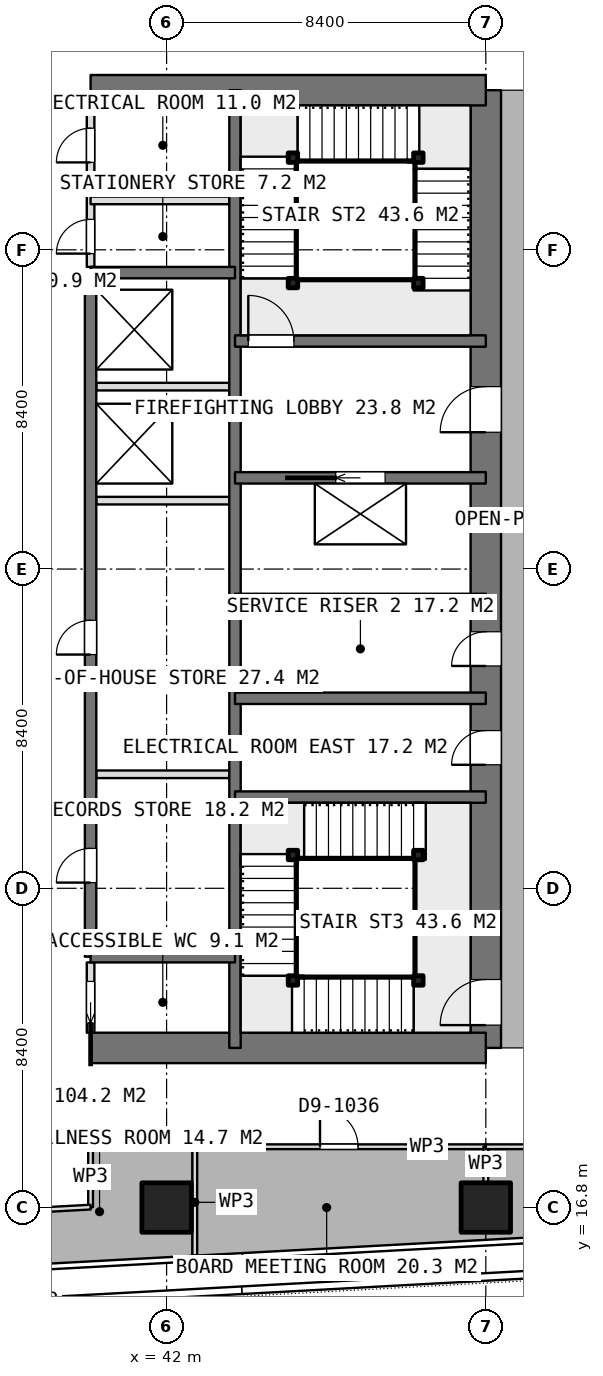
"""IFC4 building model, lengths in metres.
Left out: names, types, materials, properties, quantities, classifications, styles, units other than length and angle.
Written with IfcOpenShell. Run it as: python <this file> out.ifc"""

import sys

from ifc_helpers import new_model, si_unit, direction, frame, frame_2d, origin, origin_2d, place, context, subcontext, project, spatial, rectangle, extrude, element, fill, save


model = new_model("IFC4")
c1 = context("Model", 3, precision=1e-05, world=origin(), true_north=direction((0.0, 1.0)))
c2 = subcontext(c1, "Body", "Model", "MODEL_VIEW")
j1 = project(units=[si_unit("LENGTHUNIT", "METRE"), si_unit("PLANEANGLEUNIT", "RADIAN")], contexts=[c1])
p1 = place(None, origin())
s1 = spatial("IfcSite", under=j1, at=p1, CompositionType="ELEMENT")
p2 = place(p1, origin())
s2 = spatial("IfcBuilding", under=s1, at=p2, CompositionType="ELEMENT")
p3 = place(p2, frame((0.0, 0.0, 280.1)))
s3 = spatial("IfcBuildingStorey", under=s2, at=p3, CompositionType="ELEMENT", Elevation=280.1)
for number, where, z_axis, x_axis in (
    (1, (40.0, 21.0, 0.0), (0.0, 0.0, 1.0), (1.0, 0.0, 0.0)),
    (2, (40.0, 46.2, 0.0), (0.0, 0.0, 1.0), (1.0, 0.0, 0.0)),
):
    element("IfcWall", number, at=place(p3, frame(where, z_axis=z_axis, x_axis=x_axis)), inside=s3, PredefinedType="SHEAR", context=c2, shape_type="SweptSolid", body=[
        extrude(rectangle(XDim=10.4, YDim=0.8, at=frame_2d((5.2, 0.0))), origin(), (0.0, 0.0, 1.0), 3.75),
    ])
p4 = place(p3, frame((50.4, 21.0, 0.0), z_axis=(0.0, 0.0, 1.0), x_axis=(0.0, 1.0, 0.0)))
e3 = element("IfcWall", 3, at=p4, inside=s3, PredefinedType="SHEAR", context=c2, shape_type="SweptSolid", body=[
    extrude(rectangle(XDim=25.2, YDim=0.8, at=frame_2d((12.6, 0.0))), origin(), (0.0, 0.0, 1.0), 3.75),
])
p5 = place(p4, frame((16.2, 0.0, 0.0)))
e4 = element("IfcOpeningElement", 4, at=p5, cuts=e3, PredefinedType="OPENING", context=c2, shape_type="SweptSolid", body=[
    extrude(rectangle(XDim=1.2, YDim=2.1, at=frame_2d((0.6, 1.05))), frame((0.0, 0.41, 0.0), z_axis=(0.0, -1.0, 0.0), x_axis=(1.0, 0.0, 0.0)), (0.0, 0.0, 1.0), 0.82),
])
p6 = place(p4, frame((10.05, 0.0, 0.0)))
e5 = element("IfcOpeningElement", 5, at=p6, cuts=e3, PredefinedType="OPENING", context=c2, shape_type="SweptSolid", body=[
    extrude(rectangle(XDim=0.9, YDim=2.1, at=frame_2d((0.45, 1.05))), frame((0.0, 0.41, 0.0), z_axis=(0.0, -1.0, 0.0), x_axis=(1.0, 0.0, 0.0)), (0.0, 0.0, 1.0), 0.82),
])
p7 = place(p4, frame((7.45, 0.0, 0.0)))
e6 = element("IfcOpeningElement", 6, at=p7, cuts=e3, PredefinedType="OPENING", context=c2, shape_type="SweptSolid", body=[
    extrude(rectangle(XDim=0.9, YDim=2.1, at=frame_2d((0.45, 1.05))), frame((0.0, 0.41, 0.0), z_axis=(0.0, -1.0, 0.0), x_axis=(1.0, 0.0, 0.0)), (0.0, 0.0, 1.0), 0.82),
])
p8 = place(p4, frame((0.6, 0.0, 0.0)))
e7 = element("IfcOpeningElement", 7, at=p8, cuts=e3, PredefinedType="OPENING", context=c2, shape_type="SweptSolid", body=[
    extrude(rectangle(XDim=1.2, YDim=2.1, at=frame_2d((0.6, 1.05))), frame((0.0, 0.41, 0.0), z_axis=(0.0, -1.0, 0.0), x_axis=(1.0, 0.0, 0.0)), (0.0, 0.0, 1.0), 0.82),
])
p9 = place(p3, frame((43.8, 21.0, 0.0), z_axis=(0.0, 0.0, 1.0), x_axis=(0.0, 1.0, 0.0)))
e8 = element("IfcWall", 8, at=p9, inside=s3, PredefinedType="SHEAR", context=c2, shape_type="SweptSolid", body=[
    extrude(rectangle(XDim=25.2, YDim=0.3, at=frame_2d((12.6, 0.0))), origin(), (0.0, 0.0, 1.0), 3.75),
])
p10 = place(p3, frame((40.0, 23.4, 0.0), z_axis=(0.0, 0.0, 1.0), x_axis=(0.0, 1.0, 0.0)))
e9 = element("IfcWall", 9, at=p10, inside=s3, PredefinedType="SHEAR", context=c2, shape_type="SweptSolid", body=[
    extrude(rectangle(XDim=18.0, YDim=0.3, at=frame_2d((9.0, 0.0))), origin(), (0.0, 0.0, 1.0), 3.75),
])
p11 = place(p10, frame((1.95, 0.0, 0.0)))
e10 = element("IfcOpeningElement", 10, at=p11, cuts=e9, PredefinedType="OPENING", context=c2, shape_type="SweptSolid", body=[
    extrude(rectangle(XDim=0.9, YDim=2.1, at=frame_2d((0.45, 1.05))), frame((0.0, 0.16, 0.0), z_axis=(0.0, -1.0, 0.0), x_axis=(1.0, 0.0, 0.0)), (0.0, 0.0, 1.0), 0.32),
])
p12 = place(p10, frame((7.95, 0.0, 0.0)))
e11 = element("IfcOpeningElement", 11, at=p12, cuts=e9, PredefinedType="OPENING", context=c2, shape_type="SweptSolid", body=[
    extrude(rectangle(XDim=0.9, YDim=2.1, at=frame_2d((0.45, 1.05))), frame((0.0, 0.16, 0.0), z_axis=(0.0, -1.0, 0.0), x_axis=(1.0, 0.0, 0.0)), (0.0, 0.0, 1.0), 0.32),
])
for number, where, z_axis, x_axis in (
    (12, (40.0, 23.4, 0.0), (0.0, 0.0, 1.0), (1.0, 0.0, 0.0)),
    (13, (40.0, 41.4, 0.0), (0.0, 0.0, 1.0), (1.0, 0.0, 0.0)),
):
    element("IfcWall", number, at=place(p3, frame(where, z_axis=z_axis, x_axis=x_axis)), inside=s3, PredefinedType="SHEAR", context=c2, shape_type="SweptSolid", body=[
        extrude(rectangle(XDim=3.8, YDim=0.3, at=frame_2d((1.9, 0.0))), origin(), (0.0, 0.0, 1.0), 3.75),
    ])
for number, where, z_axis, x_axis in (
    (14, (43.8, 27.6, 0.0), (0.0, 0.0, 1.0), (1.0, 0.0, 0.0)),
    (15, (43.8, 30.2, 0.0), (0.0, 0.0, 1.0), (1.0, 0.0, 0.0)),
    (16, (43.8, 32.8, 0.0), (0.0, 0.0, 1.0), (1.0, 0.0, 0.0)),
):
    element("IfcWall", number, at=place(p3, frame(where, z_axis=z_axis, x_axis=x_axis)), inside=s3, PredefinedType="SHEAR", context=c2, shape_type="SweptSolid", body=[
        extrude(rectangle(XDim=6.6, YDim=0.3, at=frame_2d((3.3, 0.0))), origin(), (0.0, 0.0, 1.0), 3.75),
    ])
p13 = place(p3, frame((43.8, 36.0, 0.0), z_axis=(0.0, 0.0, 1.0), x_axis=(1.0, 0.0, 0.0)))
e17 = element("IfcWall", 17, at=p13, inside=s3, PredefinedType="SHEAR", context=c2, shape_type="SweptSolid", body=[
    extrude(rectangle(XDim=6.6, YDim=0.3, at=frame_2d((3.3, 0.0))), origin(), (0.0, 0.0, 1.0), 3.75),
])
p14 = place(p13, frame((2.65, 0.0, 0.0)))
e18 = element("IfcOpeningElement", 18, at=p14, cuts=e17, PredefinedType="OPENING", context=c2, shape_type="SweptSolid", body=[
    extrude(rectangle(XDim=1.3, YDim=2.1, at=frame_2d((0.65, 1.05))), frame((0.0, 0.16, 0.0), z_axis=(0.0, -1.0, 0.0), x_axis=(1.0, 0.0, 0.0)), (0.0, 0.0, 1.0), 0.32),
])
p15 = place(p3, frame((43.8, 39.6, 0.0), z_axis=(0.0, 0.0, 1.0), x_axis=(1.0, 0.0, 0.0)))
e19 = element("IfcWall", 19, at=p15, inside=s3, PredefinedType="SHEAR", context=c2, shape_type="SweptSolid", body=[
    extrude(rectangle(XDim=6.6, YDim=0.3, at=frame_2d((3.3, 0.0))), origin(), (0.0, 0.0, 1.0), 3.75),
])
p16 = place(p15, frame((0.35, 0.0, 0.0)))
e20 = element("IfcOpeningElement", 20, at=p16, cuts=e19, PredefinedType="OPENING", context=c2, shape_type="SweptSolid", body=[
    extrude(rectangle(XDim=1.2, YDim=2.1, at=frame_2d((0.6, 1.05))), frame((0.0, 0.16, 0.0), z_axis=(0.0, -1.0, 0.0), x_axis=(1.0, 0.0, 0.0)), (0.0, 0.0, 1.0), 0.32),
])
for number, where, z_axis, x_axis in (
    (21, (42.0, 16.8, 0.0), (0.0, 0.0, 1.0), (1.0, 0.0, 0.0)),
    (22, (50.4, 16.8, 0.0), (0.0, 0.0, 1.0), (1.0, 0.0, 0.0)),
):
    element("IfcColumn", number, at=place(p3, frame(where, z_axis=z_axis, x_axis=x_axis)), inside=s3, PredefinedType="COLUMN", context=c2, shape_type="SweptSolid", body=[
        extrude(rectangle(XDim=1.3, YDim=1.3, at=origin_2d()), origin(), (0.0, 0.0, 1.0), 3.75),
    ])
for number, where, z_axis, x_axis in (
    (23, (40.15, 35.4, 0.0), (0.0, 0.0, 1.0), (1.0, 0.0, 0.0)),
    (24, (40.15, 38.4, 0.0), (0.0, 0.0, 1.0), (1.0, 0.0, 0.0)),
):
    element("IfcWall", number, at=place(p3, frame(where, z_axis=z_axis, x_axis=x_axis)), inside=s3, PredefinedType="PARTITIONING", context=c2, shape_type="SweptSolid", body=[
        extrude(rectangle(XDim=3.5, YDim=0.2, at=frame_2d((1.75, 0.0))), origin(), (0.0, 0.0, 1.0), 3.5),
    ])
p17 = place(p3, frame((40.0, 21.4, 0.0), z_axis=(0.0, 0.0, 1.0), x_axis=(0.0, 1.0, 0.0)))
e25 = element("IfcWall", 25, at=p17, inside=s3, PredefinedType="PARTITIONING", context=c2, shape_type="SweptSolid", body=[
    extrude(rectangle(XDim=1.85, YDim=0.2, at=frame_2d((0.925, 0.0))), origin(), (0.0, 0.0, 1.0), 3.5),
])
p18 = place(p17, frame((0.25, 0.0, 0.0)))
e26 = element("IfcOpeningElement", 26, at=p18, cuts=e25, PredefinedType="OPENING", context=c2, shape_type="SweptSolid", body=[
    extrude(rectangle(XDim=1.1, YDim=2.1, at=frame_2d((0.55, 1.05))), frame((0.0, 0.11, 0.0), z_axis=(0.0, -1.0, 0.0), x_axis=(1.0, 0.0, 0.0)), (0.0, 0.0, 1.0), 0.22),
])
p19 = place(p3, frame((40.0, 41.55, 0.0), z_axis=(0.0, 0.0, 1.0), x_axis=(0.0, 1.0, 0.0)))
e27 = element("IfcWall", 27, at=p19, inside=s3, PredefinedType="PARTITIONING", context=c2, shape_type="SweptSolid", body=[
    extrude(rectangle(XDim=4.25, YDim=0.2, at=frame_2d((2.125, 0.0))), origin(), (0.0, 0.0, 1.0), 3.5),
])
p20 = place(p19, frame((2.75, 0.0, 0.0)))
e28 = element("IfcOpeningElement", 28, at=p20, cuts=e27, PredefinedType="OPENING", context=c2, shape_type="SweptSolid", body=[
    extrude(rectangle(XDim=0.9, YDim=2.1, at=frame_2d((0.45, 1.05))), frame((0.0, 0.11, 0.0), z_axis=(0.0, -1.0, 0.0), x_axis=(1.0, 0.0, 0.0)), (0.0, 0.0, 1.0), 0.22),
])
p21 = place(p19, frame((0.35, 0.0, 0.0)))
e29 = element("IfcOpeningElement", 29, at=p21, cuts=e27, PredefinedType="OPENING", context=c2, shape_type="SweptSolid", body=[
    extrude(rectangle(XDim=0.9, YDim=2.1, at=frame_2d((0.45, 1.05))), frame((0.0, 0.11, 0.0), z_axis=(0.0, -1.0, 0.0), x_axis=(1.0, 0.0, 0.0)), (0.0, 0.0, 1.0), 0.22),
])
p22 = place(p3, frame((40.15, 28.2, 0.0), z_axis=(0.0, 0.0, 1.0), x_axis=(1.0, 0.0, 0.0)))
e30 = element("IfcWall", 30, at=p22, inside=s3, PredefinedType="PARTITIONING", context=c2, shape_type="SweptSolid", body=[
    extrude(rectangle(XDim=3.5, YDim=0.2, at=frame_2d((1.75, 0.0))), origin(), (0.0, 0.0, 1.0), 3.5),
])
p23 = place(p3, frame((40.0, 43.3, 0.0), z_axis=(0.0, 0.0, 1.0), x_axis=(1.0, 0.0, 0.0)))
e31 = element("IfcWall", 31, at=p23, inside=s3, PredefinedType="PARTITIONING", context=c2, shape_type="SweptSolid", body=[
    extrude(rectangle(XDim=3.65, YDim=0.2, at=frame_2d((1.825, 0.0))), origin(), (0.0, 0.0, 1.0), 3.5),
])
p24 = place(p3, frame((40.0, 16.811, 0.0), z_axis=(0.0, 0.0, 1.0), x_axis=(0.0, 1.0, 0.0)))
e32 = element("IfcWall", 32, at=p24, inside=s3, PredefinedType="PARTITIONING", context=c2, shape_type="SweptSolid", body=[
    extrude(rectangle(XDim=1.589, YDim=0.125, at=frame_2d((0.794, 0.0))), origin(), (0.0, 0.0, 1.0), 3.5),
])
p25 = place(p3, frame((40.0, 18.4, 0.0), z_axis=(0.0, 0.0, 1.0), x_axis=(1.0, 0.0, 0.0)))
e33 = element("IfcWall", 33, at=p25, inside=s3, PredefinedType="PARTITIONING", context=c2, shape_type="SweptSolid", body=[
    extrude(rectangle(XDim=2.673, YDim=0.125, at=frame_2d((1.336, 0.0))), origin(), (0.0, 0.0, 1.0), 3.5),
])
p26 = place(p3, frame((42.742, 18.337, 0.0), z_axis=(0.0, 0.0, 1.0), x_axis=(0.0, -1.0, 0.0)))
e34 = element("IfcWall", 34, at=p26, inside=s3, PredefinedType="PARTITIONING", context=c2, shape_type="SweptSolid", body=[
    extrude(rectangle(XDim=2.799, YDim=0.125, at=frame_2d((1.399, 0.0))), origin(), (0.0, 0.0, 1.0), 3.5),
])
p27 = place(p3, frame((35.599, 16.571, 0.0), z_axis=(0.0, 0.0, 1.0), x_axis=(0.998516419886, 0.054451439074, 0.0)))
e35 = element("IfcWall", 35, at=p27, inside=s3, PredefinedType="PARTITIONING", context=c2, shape_type="SweptSolid", body=[
    extrude(rectangle(XDim=4.407, YDim=0.125, at=frame_2d((2.204, 0.0))), origin(), (0.0, 0.0, 1.0), 3.5),
])
p28 = place(p27, frame((1.704, 0.0, 0.0)))
e36 = element("IfcOpeningElement", 36, at=p28, cuts=e35, PredefinedType="OPENING", context=c2, shape_type="SweptSolid", body=[
    extrude(rectangle(XDim=1.0, YDim=2.1, at=frame_2d((0.5, 1.05))), frame((0.0, 0.073, 0.0), z_axis=(0.0, -1.0, 0.0), x_axis=(1.0, 0.0, 0.0)), (0.0, 0.0, 1.0), 0.145),
])
p29 = place(p3, frame((42.674, 18.4, 0.0), z_axis=(0.0, 0.0, 1.0), x_axis=(1.0, 0.0, 0.0)))
e37 = element("IfcWall", 37, at=p29, inside=s3, PredefinedType="PARTITIONING", context=c2, shape_type="SweptSolid", body=[
    extrude(rectangle(XDim=7.726, YDim=0.125, at=frame_2d((3.863, 0.0))), origin(), (0.0, 0.0, 1.0), 3.5),
])
p30 = place(p29, frame((3.363, 0.0, 0.0)))
e38 = element("IfcOpeningElement", 38, at=p30, cuts=e37, PredefinedType="OPENING", context=c2, shape_type="SweptSolid", body=[
    extrude(rectangle(XDim=1.0, YDim=2.1, at=frame_2d((0.5, 1.05))), frame((0.0, 0.073, 0.0), z_axis=(0.0, -1.0, 0.0), x_axis=(1.0, 0.0, 0.0)), (0.0, 0.0, 1.0), 0.145),
])
p31 = place(p3, frame((50.4, 18.4, 0.0), z_axis=(0.0, 0.0, 1.0), x_axis=(0.0, -1.0, 0.0)))
e39 = element("IfcWall", 39, at=p31, inside=s3, PredefinedType="PARTITIONING", context=c2, shape_type="SweptSolid", body=[
    extrude(rectangle(XDim=0.93, YDim=0.125, at=frame_2d((0.465, 0.0))), origin(), (0.0, 0.0, 1.0), 3.5),
])
p32 = place(p3, frame((50.401, 18.4, 0.0), z_axis=(0.0, 0.0, 1.0), x_axis=(1.0, 0.0, 0.0)))
e40 = element("IfcWall", 40, at=p32, inside=s3, PredefinedType="PARTITIONING", context=c2, shape_type="SweptSolid", body=[
    extrude(rectangle(XDim=5.999, YDim=0.125, at=frame_2d((3.0, 0.0))), origin(), (0.0, 0.0, 1.0), 3.5),
])
p33 = place(p32, frame((2.499, 0.0, 0.0)))
e41 = element("IfcOpeningElement", 41, at=p33, cuts=e40, PredefinedType="OPENING", context=c2, shape_type="SweptSolid", body=[
    extrude(rectangle(XDim=1.0, YDim=2.1, at=frame_2d((0.5, 1.05))), frame((0.0, 0.073, 0.0), z_axis=(0.0, -1.0, 0.0), x_axis=(1.0, 0.0, 0.0)), (0.0, 0.0, 1.0), 0.145),
])
for number, where, z_axis, x_axis in (
    (42, (45.325, 41.125, 0.0), (0.0, 0.0, 1.0), (1.0, 0.0, 0.0)),
    (43, (45.325, 44.425, 0.0), (0.0, 0.0, 1.0), (1.0, 0.0, 0.0)),
    (44, (48.625, 44.425, 0.0), (0.0, 0.0, 1.0), (1.0, 0.0, 0.0)),
    (45, (48.625, 41.125, 0.0), (0.0, 0.0, 1.0), (1.0, 0.0, 0.0)),
    (46, (48.625, 22.775, 0.0), (0.0, 0.0, 1.0), (1.0, 0.0, 0.0)),
    (47, (45.325, 22.775, 0.0), (0.0, 0.0, 1.0), (1.0, 0.0, 0.0)),
    (48, (45.325, 26.075, 0.0), (0.0, 0.0, 1.0), (1.0, 0.0, 0.0)),
    (49, (48.625, 26.075, 0.0), (0.0, 0.0, 1.0), (1.0, 0.0, 0.0)),
):
    element("IfcColumn", number, at=place(p3, frame(where, z_axis=z_axis, x_axis=x_axis)), inside=s3, PredefinedType="COLUMN", context=c2, shape_type="SweptSolid", body=[
        extrude(rectangle(XDim=0.25, YDim=0.25, at=origin_2d()), origin(), (0.0, 0.0, 1.0), 3.75),
    ])
p34 = place(p5, origin())
e50 = element("IfcDoor", 50, at=p34, inside=s3, OperationType="SINGLE_SWING_LEFT", PredefinedType="DOOR", context=c2, shape_type="SweptSolid", body=[
    extrude(rectangle(XDim=1.2, YDim=2.1, at=frame_2d((0.6, 1.05))), frame((0.0, 0.025, 0.0), z_axis=(0.0, -1.0, 0.0), x_axis=(1.0, 0.0, 0.0)), (0.0, 0.0, 1.0), 0.05),
])
fill(e4, e50)
p35 = place(p6, origin())
e51 = element("IfcDoor", 51, at=p35, inside=s3, OperationType="SINGLE_SWING_LEFT", PredefinedType="DOOR", context=c2, shape_type="SweptSolid", body=[
    extrude(rectangle(XDim=0.9, YDim=2.1, at=frame_2d((0.45, 1.05))), frame((0.0, 0.025, 0.0), z_axis=(0.0, -1.0, 0.0), x_axis=(1.0, 0.0, 0.0)), (0.0, 0.0, 1.0), 0.05),
])
fill(e5, e51)
p36 = place(p7, origin())
e52 = element("IfcDoor", 52, at=p36, inside=s3, OperationType="SINGLE_SWING_LEFT", PredefinedType="DOOR", context=c2, shape_type="SweptSolid", body=[
    extrude(rectangle(XDim=0.9, YDim=2.1, at=frame_2d((0.45, 1.05))), frame((0.0, 0.025, 0.0), z_axis=(0.0, -1.0, 0.0), x_axis=(1.0, 0.0, 0.0)), (0.0, 0.0, 1.0), 0.05),
])
fill(e6, e52)
p37 = place(p18, origin())
e53 = element("IfcDoor", 53, at=p37, inside=s3, OperationType="SLIDING_TO_LEFT", PredefinedType="DOOR", context=c2, shape_type="SweptSolid", body=[
    extrude(rectangle(XDim=1.1, YDim=2.1, at=frame_2d((0.55, 1.05))), frame((0.0, 0.025, 0.0), z_axis=(0.0, -1.0, 0.0), x_axis=(1.0, 0.0, 0.0)), (0.0, 0.0, 1.0), 0.05),
])
fill(e26, e53)
p38 = place(p20, origin())
e54 = element("IfcDoor", 54, at=p38, inside=s3, OperationType="SINGLE_SWING_LEFT", PredefinedType="DOOR", context=c2, shape_type="SweptSolid", body=[
    extrude(rectangle(XDim=0.9, YDim=2.1, at=frame_2d((0.45, 1.05))), frame((0.0, 0.025, 0.0), z_axis=(0.0, -1.0, 0.0), x_axis=(1.0, 0.0, 0.0)), (0.0, 0.0, 1.0), 0.05),
])
fill(e28, e54)
p39 = place(p21, origin())
e55 = element("IfcDoor", 55, at=p39, inside=s3, OperationType="SINGLE_SWING_LEFT", PredefinedType="DOOR", context=c2, shape_type="SweptSolid", body=[
    extrude(rectangle(XDim=0.9, YDim=2.1, at=frame_2d((0.45, 1.05))), frame((0.0, 0.025, 0.0), z_axis=(0.0, -1.0, 0.0), x_axis=(1.0, 0.0, 0.0)), (0.0, 0.0, 1.0), 0.05),
])
fill(e29, e55)
p40 = place(p11, origin())
e56 = element("IfcDoor", 56, at=p40, inside=s3, OperationType="SINGLE_SWING_LEFT", PredefinedType="DOOR", context=c2, shape_type="SweptSolid", body=[
    extrude(rectangle(XDim=0.9, YDim=2.1, at=frame_2d((0.45, 1.05))), frame((0.0, 0.025, 0.0), z_axis=(0.0, -1.0, 0.0), x_axis=(1.0, 0.0, 0.0)), (0.0, 0.0, 1.0), 0.05),
])
fill(e10, e56)
p41 = place(p12, origin())
e57 = element("IfcDoor", 57, at=p41, inside=s3, OperationType="SINGLE_SWING_LEFT", PredefinedType="DOOR", context=c2, shape_type="SweptSolid", body=[
    extrude(rectangle(XDim=0.9, YDim=2.1, at=frame_2d((0.45, 1.05))), frame((0.0, 0.025, 0.0), z_axis=(0.0, -1.0, 0.0), x_axis=(1.0, 0.0, 0.0)), (0.0, 0.0, 1.0), 0.05),
])
fill(e11, e57)
p42 = place(p14, origin())
e58 = element("IfcDoor", 58, at=p42, inside=s3, OperationType="SLIDING_TO_LEFT", PredefinedType="USERDEFINED", context=c2, shape_type="SweptSolid", body=[
    extrude(rectangle(XDim=1.3, YDim=2.1, at=frame_2d((0.65, 1.05))), frame((0.0, 0.025, 0.0), z_axis=(0.0, -1.0, 0.0), x_axis=(1.0, 0.0, 0.0)), (0.0, 0.0, 1.0), 0.05),
])
fill(e18, e58)
p43 = place(p30, origin())
e59 = element("IfcDoor", 59, at=p43, inside=s3, OperationType="SINGLE_SWING_LEFT", PredefinedType="DOOR", context=c2, shape_type="SweptSolid", body=[
    extrude(rectangle(XDim=1.0, YDim=2.1, at=frame_2d((0.5, 1.05))), frame((0.0, 0.025, 0.0), z_axis=(0.0, -1.0, 0.0), x_axis=(1.0, 0.0, 0.0)), (0.0, 0.0, 1.0), 0.05),
])
fill(e38, e59)
p44 = place(p16, origin())
e60 = element("IfcDoor", 60, at=p44, inside=s3, OperationType="SINGLE_SWING_RIGHT", PredefinedType="DOOR", context=c2, shape_type="SweptSolid", body=[
    extrude(rectangle(XDim=1.2, YDim=2.1, at=frame_2d((0.6, 1.05))), frame((0.0, 0.025, 0.0), z_axis=(0.0, -1.0, 0.0), x_axis=(1.0, 0.0, 0.0)), (0.0, 0.0, 1.0), 0.05),
])
fill(e20, e60)
p45 = place(p8, origin())
e61 = element("IfcDoor", 61, at=p45, inside=s3, OperationType="SINGLE_SWING_RIGHT", PredefinedType="DOOR", context=c2, shape_type="SweptSolid", body=[
    extrude(rectangle(XDim=1.2, YDim=2.1, at=frame_2d((0.6, 1.05))), frame((0.0, 0.025, 0.0), z_axis=(0.0, -1.0, 0.0), x_axis=(1.0, 0.0, 0.0)), (0.0, 0.0, 1.0), 0.05),
])
fill(e7, e61)
save(model, sys.argv[1])
